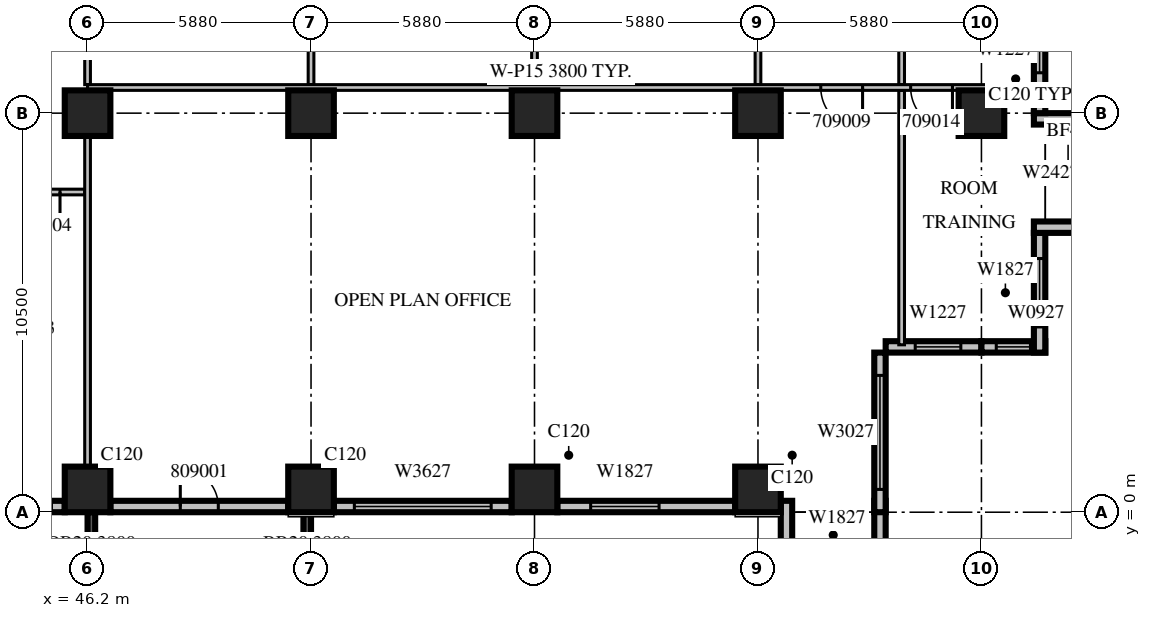
"""IFC4 building model, lengths in metres.
Left out: names, types, materials, properties, quantities, classifications, styles, units other than length and angle.
Written with IfcOpenShell. Run it as: python <this file> out.ifc"""

import sys

from ifc_helpers import new_model, si_unit, direction, frame, frame_2d, origin, origin_2d, place, context, subcontext, project, spatial, rectangle, extrude, source, transform, mapped, element, fill, save


model = new_model("IFC4")
c1 = context("Model", 3, precision=1e-05, world=origin(), true_north=direction((0.0, 1.0)))
c2 = subcontext(c1, "Body", "Model", "MODEL_VIEW")
j1 = project(units=[si_unit("LENGTHUNIT", "METRE"), si_unit("PLANEANGLEUNIT", "RADIAN")], contexts=[c1])
p1 = place(None, origin())
s1 = spatial("IfcSite", under=j1, at=p1, CompositionType="ELEMENT")
p2 = place(p1, origin())
s2 = spatial("IfcBuilding", under=s1, at=p2, CompositionType="ELEMENT")
p3 = place(p2, frame((0.0, 0.0, 48.9)))
s3 = spatial("IfcBuildingStorey", under=s2, at=p3, CompositionType="ELEMENT", Elevation=48.9)
m1 = source(origin(), c2, "Body", "SweptSolid", [
    extrude(rectangle(XDim=1.2, YDim=1.2, at=origin_2d()), origin(), (0.0, 0.0, 1.0), 4.2),
])
for number, where, z_axis, x_axis in (
    (1, (46.2, 0.6, 0.0), (0.0, 0.0, 1.0), (1.0, 0.0, 0.0)),
    (2, (52.08, 0.6, 0.0), (0.0, 0.0, 1.0), (1.0, 0.0, 0.0)),
    (3, (57.96, 0.6, 0.0), (0.0, 0.0, 1.0), (1.0, 0.0, 0.0)),
    (4, (63.84, 0.6, 0.0), (0.0, 0.0, 1.0), (1.0, 0.0, 0.0)),
    (5, (46.2, 10.5, 0.0), (0.0, 0.0, 1.0), (1.0, 0.0, 0.0)),
    (6, (52.08, 10.5, 0.0), (0.0, 0.0, 1.0), (1.0, 0.0, 0.0)),
    (7, (57.96, 10.5, 0.0), (0.0, 0.0, 1.0), (1.0, 0.0, 0.0)),
    (8, (63.84, 10.5, 0.0), (0.0, 0.0, 1.0), (1.0, 0.0, 0.0)),
    (9, (69.72, 10.5, 0.0), (0.0, 0.0, 1.0), (1.0, 0.0, 0.0)),
):
    element("IfcColumn", number, at=place(p3, frame(where, z_axis=z_axis, x_axis=x_axis)), inside=s3, PredefinedType="COLUMN", context=c2, shape_type="MappedRepresentation", body=[
        mapped(m1, transform((0.0, 0.0, 0.0), scale=1.0)),
    ])
p4 = place(p3, frame((46.3, 0.0, 0.0), z_axis=(0.0, 0.0, 1.0), x_axis=(0.0, -1.0, 0.0)))
e10 = element("IfcWall", 10, at=p4, inside=s3, PredefinedType="SOLIDWALL", context=c2, shape_type="SweptSolid", body=[
    extrude(rectangle(XDim=3.9, YDim=0.2, at=frame_2d((1.95, 0.0))), origin(), (0.0, 0.0, 1.0), 3.8),
])
m2 = source(origin(), c2, "Body", "SweptSolid", [
    extrude(rectangle(XDim=2.4, YDim=2.7, at=frame_2d((1.2, 1.35))), frame((0.0, 0.11, 0.0), z_axis=(0.0, -1.0, 0.0), x_axis=(1.0, 0.0, 0.0)), (0.0, 0.0, 1.0), 0.22),
])
p5 = place(p4, frame((0.75, 0.0, 0.6)))
e11 = element("IfcOpeningElement", 11, at=p5, cuts=e10, PredefinedType="OPENING", context=c2, shape_type="MappedRepresentation", body=[
    mapped(m2, transform((0.0, 0.0, 0.0), scale=1.0)),
])
m3 = source(origin(), c2, "Body", "SweptSolid", [
    extrude(rectangle(XDim=3.9, YDim=0.2, at=frame_2d((1.95, 0.0))), origin(), (0.0, 0.0, 1.0), 3.8),
])
p6 = place(p3, frame((51.98, 0.0, 0.0), z_axis=(0.0, 0.0, 1.0), x_axis=(0.0, -1.0, 0.0)))
e12 = element("IfcWall", 12, at=p6, inside=s3, PredefinedType="SOLIDWALL", context=c2, shape_type="MappedRepresentation", body=[
    mapped(m3, transform((0.0, 0.0, 0.0), scale=1.0)),
])
p7 = place(p6, frame((0.75, 0.0, 0.6)))
e13 = element("IfcOpeningElement", 13, at=p7, cuts=e12, PredefinedType="OPENING", context=c2, shape_type="MappedRepresentation", body=[
    mapped(m2, transform((0.0, 0.0, 0.0), scale=1.0)),
])
m4 = source(origin(), c2, "Body", "SweptSolid", [
    extrude(rectangle(XDim=1.6, YDim=0.3, at=frame_2d((0.8, 0.0))), origin(), (0.0, 0.0, 1.0), 3.8),
])
p8 = place(p3, frame((44.0, 0.15, 0.0), z_axis=(0.0, 0.0, 1.0), x_axis=(1.0, 0.0, 0.0)))
e14 = element("IfcWall", 14, at=p8, inside=s3, PredefinedType="STANDARD", context=c2, shape_type="MappedRepresentation", body=[
    mapped(m4, transform((0.0, 0.0, 0.0), scale=1.0)),
])
m5 = source(origin(), c2, "Body", "SweptSolid", [
    extrude(rectangle(XDim=0.9, YDim=2.7, at=frame_2d((0.45, 1.35))), frame((0.0, 0.16, 0.0), z_axis=(0.0, -1.0, 0.0), x_axis=(1.0, 0.0, 0.0)), (0.0, 0.0, 1.0), 0.32),
])
p9 = place(p8, frame((0.35, 0.0, 0.6)))
e15 = element("IfcOpeningElement", 15, at=p9, cuts=e14, PredefinedType="OPENING", context=c2, shape_type="MappedRepresentation", body=[
    mapped(m5, transform((0.0, 0.0, 0.0), scale=1.0)),
])
m6 = source(origin(), c2, "Body", "SweptSolid", [
    extrude(rectangle(XDim=4.68, YDim=0.3, at=frame_2d((2.34, 0.0))), origin(), (0.0, 0.0, 1.0), 3.8),
])
p10 = place(p3, frame((46.8, 0.15, 0.0), z_axis=(0.0, 0.0, 1.0), x_axis=(1.0, 0.0, 0.0)))
e16 = element("IfcWall", 16, at=p10, inside=s3, PredefinedType="STANDARD", context=c2, shape_type="MappedRepresentation", body=[
    mapped(m6, transform((0.0, 0.0, 0.0), scale=1.0)),
])
m7 = source(origin(), c2, "Body", "SweptSolid", [
    extrude(rectangle(XDim=1.0, YDim=2.1, at=frame_2d((0.5, 1.05))), frame((0.0, 0.16, 0.0), z_axis=(0.0, -1.0, 0.0), x_axis=(1.0, 0.0, 0.0)), (0.0, 0.0, 1.0), 0.32),
])
p11 = place(p10, frame((1.84, 0.0, 0.0)))
e17 = element("IfcOpeningElement", 17, at=p11, cuts=e16, PredefinedType="OPENING", context=c2, shape_type="MappedRepresentation", body=[
    mapped(m7, transform((0.0, 0.0, 0.0), scale=1.0)),
])
p12 = place(p3, frame((52.68, 0.15, 0.0), z_axis=(0.0, 0.0, 1.0), x_axis=(1.0, 0.0, 0.0)))
e18 = element("IfcWall", 18, at=p12, inside=s3, PredefinedType="STANDARD", context=c2, shape_type="MappedRepresentation", body=[
    mapped(m6, transform((0.0, 0.0, 0.0), scale=1.0)),
])
m8 = source(origin(), c2, "Body", "SweptSolid", [
    extrude(rectangle(XDim=3.6, YDim=2.7, at=frame_2d((1.8, 1.35))), frame((0.0, 0.16, 0.0), z_axis=(0.0, -1.0, 0.0), x_axis=(1.0, 0.0, 0.0)), (0.0, 0.0, 1.0), 0.32),
])
p13 = place(p12, frame((0.54, 0.0, 0.6)))
e19 = element("IfcOpeningElement", 19, at=p13, cuts=e18, PredefinedType="OPENING", context=c2, shape_type="MappedRepresentation", body=[
    mapped(m8, transform((0.0, 0.0, 0.0), scale=1.0)),
])
p14 = place(p3, frame((58.56, 0.15, 0.0), z_axis=(0.0, 0.0, 1.0), x_axis=(1.0, 0.0, 0.0)))
e20 = element("IfcWall", 20, at=p14, inside=s3, PredefinedType="STANDARD", context=c2, shape_type="MappedRepresentation", body=[
    mapped(m6, transform((0.0, 0.0, 0.0), scale=1.0)),
])
m9 = source(origin(), c2, "Body", "SweptSolid", [
    extrude(rectangle(XDim=1.8, YDim=2.7, at=frame_2d((0.9, 1.35))), frame((0.0, 0.16, 0.0), z_axis=(0.0, -1.0, 0.0), x_axis=(1.0, 0.0, 0.0)), (0.0, 0.0, 1.0), 0.32),
])
p15 = place(p14, frame((0.877, 0.0, 0.6)))
e21 = element("IfcOpeningElement", 21, at=p15, cuts=e20, PredefinedType="OPENING", context=c2, shape_type="MappedRepresentation", body=[
    mapped(m9, transform((0.0, 0.0, 0.0), scale=1.0)),
])
m10 = source(origin(), c2, "Body", "SweptSolid", [
    extrude(rectangle(XDim=1.2, YDim=0.3, at=frame_2d((0.6, 0.0))), origin(), (0.0, 0.0, 1.0), 3.8),
])
for number, where, z_axis, x_axis in (
    (22, (64.59, 0.3, 0.0), (0.0, 0.0, 1.0), (0.0, -1.0, 0.0)),
    (23, (67.05, 0.3, 0.0), (0.0, 0.0, 1.0), (0.0, -1.0, 0.0)),
):
    element("IfcWall", number, at=place(p3, frame(where, z_axis=z_axis, x_axis=x_axis)), inside=s3, PredefinedType="STANDARD", context=c2, shape_type="MappedRepresentation", body=[
        mapped(m10, transform((0.0, 0.0, 0.0), scale=1.0)),
    ])
m11 = source(origin(), c2, "Body", "SweptSolid", [
    extrude(rectangle(XDim=4.2, YDim=0.3, at=frame_2d((2.1, 0.0))), origin(), (0.0, 0.0, 1.0), 3.8),
])
p16 = place(p3, frame((67.05, 0.0, 0.0), z_axis=(0.0, 0.0, 1.0), x_axis=(0.0, 1.0, 0.0)))
e24 = element("IfcWall", 24, at=p16, inside=s3, PredefinedType="STANDARD", context=c2, shape_type="MappedRepresentation", body=[
    mapped(m11, transform((0.0, 0.0, 0.0), scale=1.0)),
])
m12 = source(origin(), c2, "Body", "SweptSolid", [
    extrude(rectangle(XDim=3.0, YDim=2.7, at=frame_2d((1.5, 1.35))), frame((0.0, 0.16, 0.0), z_axis=(0.0, -1.0, 0.0), x_axis=(1.0, 0.0, 0.0)), (0.0, 0.0, 1.0), 0.32),
])
p17 = place(p16, frame((0.6, 0.0, 0.6)))
e25 = element("IfcOpeningElement", 25, at=p17, cuts=e24, PredefinedType="OPENING", context=c2, shape_type="MappedRepresentation", body=[
    mapped(m12, transform((0.0, 0.0, 0.0), scale=1.0)),
])
m13 = source(origin(), c2, "Body", "SweptSolid", [
    extrude(rectangle(XDim=2.52, YDim=0.3, at=frame_2d((1.26, 0.0))), origin(), (0.0, 0.0, 1.0), 3.8),
])
p18 = place(p3, frame((67.2, 4.35, 0.0), z_axis=(0.0, 0.0, 1.0), x_axis=(1.0, 0.0, 0.0)))
e26 = element("IfcWall", 26, at=p18, inside=s3, PredefinedType="STANDARD", context=c2, shape_type="MappedRepresentation", body=[
    mapped(m13, transform((0.0, 0.0, 0.0), scale=1.0)),
])
m14 = source(origin(), c2, "Body", "SweptSolid", [
    extrude(rectangle(XDim=1.2, YDim=2.7, at=frame_2d((0.6, 1.35))), frame((0.0, 0.16, 0.0), z_axis=(0.0, -1.0, 0.0), x_axis=(1.0, 0.0, 0.0)), (0.0, 0.0, 1.0), 0.32),
])
p19 = place(p18, frame((0.777, 0.0, 0.6)))
e27 = element("IfcOpeningElement", 27, at=p19, cuts=e26, PredefinedType="OPENING", context=c2, shape_type="MappedRepresentation", body=[
    mapped(m14, transform((0.0, 0.0, 0.0), scale=1.0)),
])
m15 = source(origin(), c2, "Body", "SweptSolid", [
    extrude(rectangle(XDim=1.68, YDim=0.3, at=frame_2d((0.84, 0.0))), origin(), (0.0, 0.0, 1.0), 3.8),
])
p20 = place(p3, frame((69.72, 4.35, 0.0), z_axis=(0.0, 0.0, 1.0), x_axis=(1.0, 0.0, 0.0)))
e28 = element("IfcWall", 28, at=p20, inside=s3, PredefinedType="STANDARD", context=c2, shape_type="MappedRepresentation", body=[
    mapped(m15, transform((0.0, 0.0, 0.0), scale=1.0)),
])
p21 = place(p20, frame((0.39, 0.0, 0.6)))
e29 = element("IfcOpeningElement", 29, at=p21, cuts=e28, PredefinedType="OPENING", context=c2, shape_type="MappedRepresentation", body=[
    mapped(m5, transform((0.0, 0.0, 0.0), scale=1.0)),
])
m16 = source(origin(), c2, "Body", "SweptSolid", [
    extrude(rectangle(XDim=3.15, YDim=0.3, at=frame_2d((1.575, 0.0))), origin(), (0.0, 0.0, 1.0), 3.8),
])
p22 = place(p3, frame((71.25, 4.2, 0.0), z_axis=(0.0, 0.0, 1.0), x_axis=(0.0, 1.0, 0.0)))
e30 = element("IfcWall", 30, at=p22, inside=s3, PredefinedType="STANDARD", context=c2, shape_type="MappedRepresentation", body=[
    mapped(m16, transform((0.0, 0.0, 0.0), scale=1.0)),
])
p23 = place(p22, frame((0.675, 0.0, 0.6)))
e31 = element("IfcOpeningElement", 31, at=p23, cuts=e30, PredefinedType="OPENING", context=c2, shape_type="MappedRepresentation", body=[
    mapped(m9, transform((0.0, 0.0, 0.0), scale=1.0)),
])
for number, where, z_axis, x_axis in (
    (32, (71.1, 7.5, 0.0), (0.0, 0.0, 1.0), (1.0, 0.0, 0.0)),
    (33, (71.1, 10.35, 0.0), (0.0, 0.0, 1.0), (1.0, 0.0, 0.0)),
):
    element("IfcWall", number, at=place(p3, frame(where, z_axis=z_axis, x_axis=x_axis)), inside=s3, PredefinedType="STANDARD", context=c2, shape_type="MappedRepresentation", body=[
        mapped(m10, transform((0.0, 0.0, 0.0), scale=1.0)),
    ])
m17 = source(origin(), c2, "Body", "SweptSolid", [
    extrude(rectangle(XDim=6.3, YDim=0.3, at=frame_2d((3.15, 0.0))), origin(), (0.0, 0.0, 1.0), 3.8),
])
p24 = place(p3, frame((71.25, 10.5, 0.0), z_axis=(0.0, 0.0, 1.0), x_axis=(0.0, 1.0, 0.0)))
e34 = element("IfcWall", 34, at=p24, inside=s3, PredefinedType="STANDARD", context=c2, shape_type="MappedRepresentation", body=[
    mapped(m17, transform((0.0, 0.0, 0.0), scale=1.0)),
])
p25 = place(p24, frame((1.062, 0.0, 0.6)))
e35 = element("IfcOpeningElement", 35, at=p25, cuts=e34, PredefinedType="OPENING", context=c2, shape_type="MappedRepresentation", body=[
    mapped(m14, transform((0.0, 0.0, 0.0), scale=1.0)),
])
m18 = source(origin(), c2, "Body", "SweptSolid", [
    extrude(rectangle(XDim=2.2, YDim=0.15, at=frame_2d((1.1, 0.0))), origin(), (0.0, 0.0, 1.0), 3.8),
])
p26 = place(p3, frame((46.125, 8.425, 0.0), z_axis=(0.0, 0.0, 1.0), x_axis=(-1.0, 0.0, 0.0)))
e36 = element("IfcWall", 36, at=p26, inside=s3, PredefinedType="PARTITIONING", context=c2, shape_type="MappedRepresentation", body=[
    mapped(m18, transform((0.0, 0.0, 0.0), scale=1.0)),
])
m19 = source(origin(), c2, "Body", "SweptSolid", [
    extrude(rectangle(XDim=0.9, YDim=2.1, at=frame_2d((0.45, 1.05))), frame((0.0, 0.085, 0.0), z_axis=(0.0, -1.0, 0.0), x_axis=(1.0, 0.0, 0.0)), (0.0, 0.0, 1.0), 0.17),
])
p27 = place(p26, frame((0.65, 0.0, 0.0)))
e37 = element("IfcOpeningElement", 37, at=p27, cuts=e36, PredefinedType="OPENING", context=c2, shape_type="MappedRepresentation", body=[
    mapped(m19, transform((0.0, 0.0, 0.0), scale=1.0)),
])
m20 = source(origin(), c2, "Body", "SweptSolid", [
    extrude(rectangle(XDim=3.75, YDim=0.15, at=frame_2d((1.875, 0.0))), origin(), (0.0, 0.0, 1.0), 3.8),
])
for number, where, z_axis, x_axis in (
    (38, (52.08, 11.25, 0.0), (0.0, 0.0, 1.0), (0.0, 1.0, 0.0)),
    (39, (57.96, 11.25, 0.0), (0.0, 0.0, 1.0), (0.0, 1.0, 0.0)),
    (40, (63.84, 11.25, 0.0), (0.0, 0.0, 1.0), (0.0, 1.0, 0.0)),
):
    element("IfcWall", number, at=place(p3, frame(where, z_axis=z_axis, x_axis=x_axis)), inside=s3, PredefinedType="PARTITIONING", context=c2, shape_type="MappedRepresentation", body=[
        mapped(m20, transform((0.0, 0.0, 0.0), scale=1.0)),
    ])
m21 = source(origin(), c2, "Body", "SweptSolid", [
    extrude(rectangle(XDim=8.702, YDim=0.15, at=frame_2d((4.351, 0.0))), origin(), (0.0, 0.0, 1.0), 3.8),
])
p28 = place(p3, frame((46.2, 1.199, 0.0), z_axis=(0.0, 0.0, 1.0), x_axis=(0.0, 1.0, 0.0)))
e41 = element("IfcWall", 41, at=p28, inside=s3, PredefinedType="PARTITIONING", context=c2, shape_type="MappedRepresentation", body=[
    mapped(m21, transform((0.0, 0.0, 0.0), scale=1.0)),
])
p29 = place(p3, frame((46.2, 11.25, 0.0), z_axis=(0.0, 0.0, 1.0), x_axis=(0.0, 1.0, 0.0)))
e42 = element("IfcWall", 42, at=p29, inside=s3, PredefinedType="PARTITIONING", context=c2, shape_type="MappedRepresentation", body=[
    mapped(m20, transform((0.0, 0.0, 0.0), scale=1.0)),
])
m22 = source(origin(), c2, "Body", "SweptSolid", [
    extrude(rectangle(XDim=6.695, YDim=0.15, at=frame_2d((3.348, 0.0))), origin(), (0.0, 0.0, 1.0), 3.8),
])
p30 = place(p3, frame((67.62, 4.405, 0.0), z_axis=(0.0, 0.0, 1.0), x_axis=(0.0, 1.0, 0.0)))
e43 = element("IfcWall", 43, at=p30, inside=s3, PredefinedType="PARTITIONING", context=c2, shape_type="MappedRepresentation", body=[
    mapped(m22, transform((0.0, 0.0, 0.0), scale=1.0)),
])
p31 = place(p3, frame((67.62, 11.25, 0.0), z_axis=(0.0, 0.0, 1.0), x_axis=(0.0, 1.0, 0.0)))
e44 = element("IfcWall", 44, at=p31, inside=s3, PredefinedType="PARTITIONING", context=c2, shape_type="MappedRepresentation", body=[
    mapped(m20, transform((0.0, 0.0, 0.0), scale=1.0)),
])
m23 = source(origin(), c2, "Body", "SweptSolid", [
    extrude(rectangle(XDim=24.9, YDim=0.15, at=frame_2d((12.45, 0.0))), origin(), (0.0, 0.0, 1.0), 3.8),
])
p32 = place(p3, frame((71.1, 11.175, 0.0), z_axis=(0.0, 0.0, 1.0), x_axis=(-1.0, 0.0, 0.0)))
e45 = element("IfcWall", 45, at=p32, inside=s3, PredefinedType="PARTITIONING", context=c2, shape_type="MappedRepresentation", body=[
    mapped(m23, transform((0.0, 0.0, 0.0), scale=1.0)),
])
m24 = source(origin(), c2, "Body", "SweptSolid", [
    extrude(rectangle(XDim=1.1, YDim=2.1, at=frame_2d((0.55, 1.05))), frame((0.0, 0.085, 0.0), z_axis=(0.0, -1.0, 0.0), x_axis=(1.0, 0.0, 0.0)), (0.0, 0.0, 1.0), 0.17),
])
p33 = place(p32, frame((4.508, 0.0, 0.0)))
e46 = element("IfcOpeningElement", 46, at=p33, cuts=e45, PredefinedType="OPENING", context=c2, shape_type="MappedRepresentation", body=[
    mapped(m24, transform((0.0, 0.0, 0.0), scale=1.0)),
])
p34 = place(p32, frame((2.143, 0.0, 0.0)))
e47 = element("IfcOpeningElement", 47, at=p34, cuts=e45, PredefinedType="OPENING", context=c2, shape_type="MappedRepresentation", body=[
    mapped(m24, transform((0.0, 0.0, 0.0), scale=1.0)),
])
m25 = source(origin(), c2, "Body", "SweptSolid", [
    extrude(rectangle(XDim=3.6, YDim=2.7, at=frame_2d((1.8, 1.35))), frame((0.0, 0.03, 0.0), z_axis=(0.0, -1.0, 0.0), x_axis=(1.0, 0.0, 0.0)), (0.0, 0.0, 1.0), 0.06),
])
p35 = place(p13, origin())
e48 = element("IfcWindow", 48, at=p35, inside=s3, PartitioningType="SINGLE_PANEL", PredefinedType="WINDOW", context=c2, shape_type="MappedRepresentation", body=[
    mapped(m25, transform((0.0, 0.0, 0.0), scale=1.0)),
])
fill(e19, e48)
m26 = source(origin(), c2, "Body", "SweptSolid", [
    extrude(rectangle(XDim=1.8, YDim=2.7, at=frame_2d((0.9, 1.35))), frame((0.0, 0.03, 0.0), z_axis=(0.0, -1.0, 0.0), x_axis=(1.0, 0.0, 0.0)), (0.0, 0.0, 1.0), 0.06),
])
p36 = place(p15, origin())
e49 = element("IfcWindow", 49, at=p36, inside=s3, PartitioningType="SINGLE_PANEL", PredefinedType="WINDOW", context=c2, shape_type="MappedRepresentation", body=[
    mapped(m26, transform((0.0, 0.0, 0.0), scale=1.0)),
])
fill(e21, e49)
m27 = source(origin(), c2, "Body", "SweptSolid", [
    extrude(rectangle(XDim=3.0, YDim=2.7, at=frame_2d((1.5, 1.35))), frame((0.0, 0.03, 0.0), z_axis=(0.0, -1.0, 0.0), x_axis=(1.0, 0.0, 0.0)), (0.0, 0.0, 1.0), 0.06),
])
p37 = place(p17, origin())
e50 = element("IfcWindow", 50, at=p37, inside=s3, PartitioningType="SINGLE_PANEL", PredefinedType="WINDOW", context=c2, shape_type="MappedRepresentation", body=[
    mapped(m27, transform((0.0, 0.0, 0.0), scale=1.0)),
])
fill(e25, e50)
m28 = source(origin(), c2, "Body", "SweptSolid", [
    extrude(rectangle(XDim=1.2, YDim=2.7, at=frame_2d((0.6, 1.35))), frame((0.0, 0.03, 0.0), z_axis=(0.0, -1.0, 0.0), x_axis=(1.0, 0.0, 0.0)), (0.0, 0.0, 1.0), 0.06),
])
p38 = place(p19, origin())
e51 = element("IfcWindow", 51, at=p38, inside=s3, PartitioningType="SINGLE_PANEL", PredefinedType="WINDOW", context=c2, shape_type="MappedRepresentation", body=[
    mapped(m28, transform((0.0, 0.0, 0.0), scale=1.0)),
])
fill(e27, e51)
m29 = source(origin(), c2, "Body", "SweptSolid", [
    extrude(rectangle(XDim=0.9, YDim=2.7, at=frame_2d((0.45, 1.35))), frame((0.0, 0.03, 0.0), z_axis=(0.0, -1.0, 0.0), x_axis=(1.0, 0.0, 0.0)), (0.0, 0.0, 1.0), 0.06),
])
p39 = place(p21, origin())
e52 = element("IfcWindow", 52, at=p39, inside=s3, PartitioningType="SINGLE_PANEL", PredefinedType="WINDOW", context=c2, shape_type="MappedRepresentation", body=[
    mapped(m29, transform((0.0, 0.0, 0.0), scale=1.0)),
])
fill(e29, e52)
p40 = place(p23, origin())
e53 = element("IfcWindow", 53, at=p40, inside=s3, PartitioningType="SINGLE_PANEL", PredefinedType="WINDOW", context=c2, shape_type="MappedRepresentation", body=[
    mapped(m26, transform((0.0, 0.0, 0.0), scale=1.0)),
])
fill(e31, e53)
p41 = place(p25, origin())
e54 = element("IfcWindow", 54, at=p41, inside=s3, PartitioningType="SINGLE_PANEL", PredefinedType="WINDOW", context=c2, shape_type="MappedRepresentation", body=[
    mapped(m28, transform((0.0, 0.0, 0.0), scale=1.0)),
])
fill(e35, e54)
m30 = source(origin(), c2, "Body", "SweptSolid", [
    extrude(rectangle(XDim=0.9, YDim=2.1, at=frame_2d((0.45, 1.05))), frame((0.0, 0.025, 0.0), z_axis=(0.0, -1.0, 0.0), x_axis=(1.0, 0.0, 0.0)), (0.0, 0.0, 1.0), 0.05),
])
p42 = place(p27, origin())
e55 = element("IfcDoor", 55, at=p42, inside=s3, OperationType="SINGLE_SWING_LEFT", PredefinedType="DOOR", context=c2, shape_type="MappedRepresentation", body=[
    mapped(m30, transform((0.0, 0.0, 0.0), scale=1.0)),
])
fill(e37, e55)
m31 = source(origin(), c2, "Body", "SweptSolid", [
    extrude(rectangle(XDim=1.1, YDim=2.1, at=frame_2d((0.55, 1.05))), frame((0.0, 0.025, 0.0), z_axis=(0.0, -1.0, 0.0), x_axis=(1.0, 0.0, 0.0)), (0.0, 0.0, 1.0), 0.05),
])
p43 = place(p33, origin())
e56 = element("IfcDoor", 56, at=p43, inside=s3, OperationType="SINGLE_SWING_LEFT", PredefinedType="DOOR", context=c2, shape_type="MappedRepresentation", body=[
    mapped(m31, transform((0.0, 0.0, 0.0), scale=1.0)),
])
fill(e46, e56)
p44 = place(p34, origin())
e57 = element("IfcDoor", 57, at=p44, inside=s3, OperationType="SINGLE_SWING_LEFT", PredefinedType="DOOR", context=c2, shape_type="MappedRepresentation", body=[
    mapped(m31, transform((0.0, 0.0, 0.0), scale=1.0)),
])
fill(e47, e57)
m32 = source(origin(), c2, "Body", "SweptSolid", [
    extrude(rectangle(XDim=1.0, YDim=2.1, at=frame_2d((0.5, 1.05))), frame((0.0, 0.025, 0.0), z_axis=(0.0, -1.0, 0.0), x_axis=(1.0, 0.0, 0.0)), (0.0, 0.0, 1.0), 0.05),
])
p45 = place(p11, origin())
e58 = element("IfcDoor", 58, at=p45, inside=s3, OperationType="SINGLE_SWING_LEFT", PredefinedType="DOOR", context=c2, shape_type="MappedRepresentation", body=[
    mapped(m32, transform((0.0, 0.0, 0.0), scale=1.0)),
])
fill(e17, e58)
save(model, sys.argv[1])
